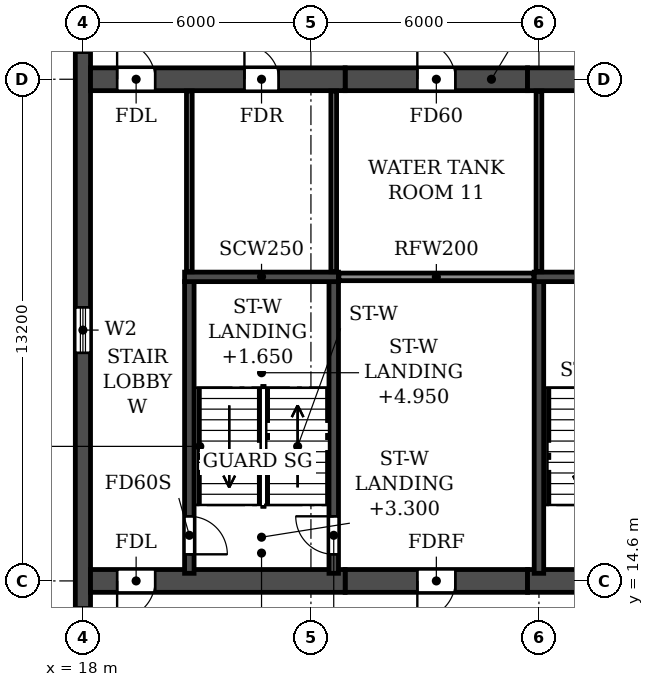
"""IFC4 building model, lengths in metres.
Left out: names, types, materials, properties, quantities, classifications, styles, units other than length and angle.
Written with IfcOpenShell. Run it as: python <this file> out.ifc"""

import sys

from ifc_helpers import new_model, si_unit, direction, frame, frame_2d, origin, place, context, subcontext, project, spatial, rectangle, extrude, element, fill, save


model = new_model("IFC4")
c1 = context("Model", 3, precision=1e-05, world=origin(), true_north=direction((0.0, 1.0)))
c2 = subcontext(c1, "Body", "Model", "MODEL_VIEW")
j1 = project(units=[si_unit("LENGTHUNIT", "METRE"), si_unit("PLANEANGLEUNIT", "RADIAN")], contexts=[c1])
p1 = place(None, origin())
s1 = spatial("IfcSite", under=j1, at=p1, CompositionType="ELEMENT")
p2 = place(p1, origin())
s2 = spatial("IfcBuilding", under=s1, at=p2, CompositionType="ELEMENT")
p3 = place(p2, frame((0.0, 0.0, 214.8)))
s3 = spatial("IfcBuildingStorey", under=s2, at=p3, CompositionType="ELEMENT", Elevation=214.8)
p4 = place(p3, frame((18.0, 4.683, 0.0), z_axis=(0.0, 0.0, 1.0), x_axis=(0.0, 1.0, 0.0)))
e1 = element("IfcWall", 1, at=p4, inside=s3, PredefinedType="SHEAR", context=c2, shape_type="SweptSolid", body=[
    extrude(rectangle(XDim=31.834, YDim=0.4, at=frame_2d((15.917, 0.0))), origin(), (0.0, 0.0, 1.0), 6.38),
])
p5 = place(p4, frame((23.817, 0.0, 0.9)))
e2 = element("IfcOpeningElement", 2, at=p5, cuts=e1, PredefinedType="OPENING", context=c2, shape_type="SweptSolid", body=[
    extrude(rectangle(XDim=1.2, YDim=1.5, at=frame_2d((0.6, 0.75))), frame((0.0, 0.21, 0.0), z_axis=(0.0, -1.0, 0.0), x_axis=(1.0, 0.0, 0.0)), (0.0, 0.0, 1.0), 0.42),
])
p6 = place(p4, frame((8.017, 0.0, 0.9)))
e3 = element("IfcOpeningElement", 3, at=p6, cuts=e1, PredefinedType="OPENING", context=c2, shape_type="SweptSolid", body=[
    extrude(rectangle(XDim=1.2, YDim=1.5, at=frame_2d((0.6, 0.75))), frame((0.0, 0.21, 0.0), z_axis=(0.0, -1.0, 0.0), x_axis=(1.0, 0.0, 0.0)), (0.0, 0.0, 1.0), 0.42),
])
p7 = place(p4, frame((15.917, 0.0, 0.9)))
e4 = element("IfcOpeningElement", 4, at=p7, cuts=e1, PredefinedType="OPENING", context=c2, shape_type="SweptSolid", body=[
    extrude(rectangle(XDim=1.2, YDim=1.5, at=frame_2d((0.6, 0.75))), frame((0.0, 0.21, 0.0), z_axis=(0.0, -1.0, 0.0), x_axis=(1.0, 0.0, 0.0)), (0.0, 0.0, 1.0), 0.42),
])
p8 = place(p3, frame((24.9, 14.6, 0.0), z_axis=(0.0, 0.0, 1.0), x_axis=(1.0, 0.0, 0.0)))
e5 = element("IfcWall", 5, at=p8, inside=s3, PredefinedType="SHEAR", context=c2, shape_type="SweptSolid", body=[
    extrude(rectangle(XDim=4.8, YDim=0.6, at=frame_2d((2.4, 0.0))), origin(), (0.0, 0.0, 1.0), 6.38),
])
p9 = place(p8, frame((1.9, 0.0, 0.0)))
e6 = element("IfcOpeningElement", 6, at=p9, cuts=e5, PredefinedType="OPENING", context=c2, shape_type="SweptSolid", body=[
    extrude(rectangle(XDim=1.0, YDim=2.1, at=frame_2d((0.5, 1.05))), frame((0.0, 0.31, 0.0), z_axis=(0.0, -1.0, 0.0), x_axis=(1.0, 0.0, 0.0)), (0.0, 0.0, 1.0), 0.62),
])
p10 = place(p3, frame((24.9, 27.8, 0.0), z_axis=(0.0, 0.0, 1.0), x_axis=(1.0, 0.0, 0.0)))
e7 = element("IfcWall", 7, at=p10, inside=s3, PredefinedType="SHEAR", context=c2, shape_type="SweptSolid", body=[
    extrude(rectangle(XDim=4.8, YDim=0.6, at=frame_2d((2.4, 0.0))), origin(), (0.0, 0.0, 1.0), 6.38),
])
p11 = place(p10, frame((1.9, 0.0, 0.0)))
e8 = element("IfcOpeningElement", 8, at=p11, cuts=e7, PredefinedType="OPENING", context=c2, shape_type="SweptSolid", body=[
    extrude(rectangle(XDim=1.0, YDim=2.1, at=frame_2d((0.5, 1.05))), frame((0.0, 0.31, 0.0), z_axis=(0.0, -1.0, 0.0), x_axis=(1.0, 0.0, 0.0)), (0.0, 0.0, 1.0), 0.62),
])
p12 = place(p3, frame((18.2, 14.6, 0.0), z_axis=(0.0, 0.0, 1.0), x_axis=(1.0, 0.0, 0.0)))
e9 = element("IfcWall", 9, at=p12, inside=s3, PredefinedType="SOLIDWALL", context=c2, shape_type="SweptSolid", body=[
    extrude(rectangle(XDim=6.7, YDim=0.6, at=frame_2d((3.35, 0.0))), origin(), (0.0, 0.0, 1.0), 6.38),
])
p13 = place(p12, frame((0.7, 0.0, 0.0)))
e10 = element("IfcOpeningElement", 10, at=p13, cuts=e9, PredefinedType="OPENING", context=c2, shape_type="SweptSolid", body=[
    extrude(rectangle(XDim=1.0, YDim=2.1, at=frame_2d((0.5, 1.05))), frame((0.0, 0.31, 0.0), z_axis=(0.0, -1.0, 0.0), x_axis=(1.0, 0.0, 0.0)), (0.0, 0.0, 1.0), 0.62),
])
p14 = place(p3, frame((29.7, 14.6, 0.0), z_axis=(0.0, 0.0, 1.0), x_axis=(1.0, 0.0, 0.0)))
e11 = element("IfcWall", 11, at=p14, inside=s3, PredefinedType="SOLIDWALL", context=c2, shape_type="SweptSolid", body=[
    extrude(rectangle(XDim=42.6, YDim=0.6, at=frame_2d((21.3, 0.0))), origin(), (0.0, 0.0, 1.0), 6.38),
])
p15 = place(p14, frame((1.7, 0.0, 0.0)))
e12 = element("IfcOpeningElement", 12, at=p15, cuts=e11, PredefinedType="OPENING", context=c2, shape_type="SweptSolid", body=[
    extrude(rectangle(XDim=1.0, YDim=2.1, at=frame_2d((0.5, 1.05))), frame((0.0, 0.31, 0.0), z_axis=(0.0, -1.0, 0.0), x_axis=(1.0, 0.0, 0.0)), (0.0, 0.0, 1.0), 0.62),
])
p16 = place(p14, frame((15.6, 0.0, 0.0)))
e13 = element("IfcOpeningElement", 13, at=p16, cuts=e11, PredefinedType="OPENING", context=c2, shape_type="SweptSolid", body=[
    extrude(rectangle(XDim=1.0, YDim=2.1, at=frame_2d((0.5, 1.05))), frame((0.0, 0.31, 0.0), z_axis=(0.0, -1.0, 0.0), x_axis=(1.0, 0.0, 0.0)), (0.0, 0.0, 1.0), 0.62),
])
p17 = place(p14, frame((20.8, 0.0, 0.0)))
e14 = element("IfcOpeningElement", 14, at=p17, cuts=e11, PredefinedType="OPENING", context=c2, shape_type="SweptSolid", body=[
    extrude(rectangle(XDim=1.0, YDim=2.1, at=frame_2d((0.5, 1.05))), frame((0.0, 0.31, 0.0), z_axis=(0.0, -1.0, 0.0), x_axis=(1.0, 0.0, 0.0)), (0.0, 0.0, 1.0), 0.62),
])
p18 = place(p14, frame((25.75, 0.0, 0.0)))
e15 = element("IfcOpeningElement", 15, at=p18, cuts=e11, PredefinedType="OPENING", context=c2, shape_type="SweptSolid", body=[
    extrude(rectangle(XDim=1.5, YDim=2.1, at=frame_2d((0.75, 1.05))), frame((0.0, 0.31, 0.0), z_axis=(0.0, -1.0, 0.0), x_axis=(1.0, 0.0, 0.0)), (0.0, 0.0, 1.0), 0.62),
])
p19 = place(p14, frame((39.9, 0.0, 0.0)))
e16 = element("IfcOpeningElement", 16, at=p19, cuts=e11, PredefinedType="OPENING", context=c2, shape_type="SweptSolid", body=[
    extrude(rectangle(XDim=1.0, YDim=2.1, at=frame_2d((0.5, 1.05))), frame((0.0, 0.31, 0.0), z_axis=(0.0, -1.0, 0.0), x_axis=(1.0, 0.0, 0.0)), (0.0, 0.0, 1.0), 0.62),
])
p20 = place(p3, frame((18.2, 27.8, 0.0), z_axis=(0.0, 0.0, 1.0), x_axis=(1.0, 0.0, 0.0)))
e17 = element("IfcWall", 17, at=p20, inside=s3, PredefinedType="SOLIDWALL", context=c2, shape_type="SweptSolid", body=[
    extrude(rectangle(XDim=6.7, YDim=0.6, at=frame_2d((3.35, 0.0))), origin(), (0.0, 0.0, 1.0), 6.38),
])
p21 = place(p20, frame((0.7, 0.0, 0.0)))
e18 = element("IfcOpeningElement", 18, at=p21, cuts=e17, PredefinedType="OPENING", context=c2, shape_type="SweptSolid", body=[
    extrude(rectangle(XDim=1.0, YDim=2.1, at=frame_2d((0.5, 1.05))), frame((0.0, 0.31, 0.0), z_axis=(0.0, -1.0, 0.0), x_axis=(1.0, 0.0, 0.0)), (0.0, 0.0, 1.0), 0.62),
])
p22 = place(p20, frame((4.05, 0.0, 0.0)))
e19 = element("IfcOpeningElement", 19, at=p22, cuts=e17, PredefinedType="OPENING", context=c2, shape_type="SweptSolid", body=[
    extrude(rectangle(XDim=0.9, YDim=2.1, at=frame_2d((0.45, 1.05))), frame((0.0, 0.31, 0.0), z_axis=(0.0, -1.0, 0.0), x_axis=(1.0, 0.0, 0.0)), (0.0, 0.0, 1.0), 0.62),
])
p23 = place(p3, frame((29.7, 27.8, 0.0), z_axis=(0.0, 0.0, 1.0), x_axis=(1.0, 0.0, 0.0)))
e20 = element("IfcWall", 20, at=p23, inside=s3, PredefinedType="SOLIDWALL", context=c2, shape_type="SweptSolid", body=[
    extrude(rectangle(XDim=42.6, YDim=0.6, at=frame_2d((21.3, 0.0))), origin(), (0.0, 0.0, 1.0), 6.38),
])
p24 = place(p23, frame((1.75, 0.0, 0.0)))
e21 = element("IfcOpeningElement", 21, at=p24, cuts=e20, PredefinedType="OPENING", context=c2, shape_type="SweptSolid", body=[
    extrude(rectangle(XDim=0.9, YDim=2.1, at=frame_2d((0.45, 1.05))), frame((0.0, 0.31, 0.0), z_axis=(0.0, -1.0, 0.0), x_axis=(1.0, 0.0, 0.0)), (0.0, 0.0, 1.0), 0.62),
])
p25 = place(p23, frame((7.5, 0.0, 0.0)))
e22 = element("IfcOpeningElement", 22, at=p25, cuts=e20, PredefinedType="OPENING", context=c2, shape_type="SweptSolid", body=[
    extrude(rectangle(XDim=1.0, YDim=2.1, at=frame_2d((0.5, 1.05))), frame((0.0, 0.31, 0.0), z_axis=(0.0, -1.0, 0.0), x_axis=(1.0, 0.0, 0.0)), (0.0, 0.0, 1.0), 0.62),
])
p26 = place(p23, frame((12.7, 0.0, 0.0)))
e23 = element("IfcOpeningElement", 23, at=p26, cuts=e20, PredefinedType="OPENING", context=c2, shape_type="SweptSolid", body=[
    extrude(rectangle(XDim=1.0, YDim=2.1, at=frame_2d((0.5, 1.05))), frame((0.0, 0.31, 0.0), z_axis=(0.0, -1.0, 0.0), x_axis=(1.0, 0.0, 0.0)), (0.0, 0.0, 1.0), 0.62),
])
p27 = place(p23, frame((17.9, 0.0, 0.0)))
e24 = element("IfcOpeningElement", 24, at=p27, cuts=e20, PredefinedType="OPENING", context=c2, shape_type="SweptSolid", body=[
    extrude(rectangle(XDim=1.0, YDim=2.1, at=frame_2d((0.5, 1.05))), frame((0.0, 0.31, 0.0), z_axis=(0.0, -1.0, 0.0), x_axis=(1.0, 0.0, 0.0)), (0.0, 0.0, 1.0), 0.62),
])
p28 = place(p23, frame((20.8, 0.0, 0.0)))
e25 = element("IfcOpeningElement", 25, at=p28, cuts=e20, PredefinedType="OPENING", context=c2, shape_type="SweptSolid", body=[
    extrude(rectangle(XDim=1.0, YDim=2.1, at=frame_2d((0.5, 1.05))), frame((0.0, 0.31, 0.0), z_axis=(0.0, -1.0, 0.0), x_axis=(1.0, 0.0, 0.0)), (0.0, 0.0, 1.0), 0.62),
])
p29 = place(p23, frame((23.7, 0.0, 0.0)))
e26 = element("IfcOpeningElement", 26, at=p29, cuts=e20, PredefinedType="OPENING", context=c2, shape_type="SweptSolid", body=[
    extrude(rectangle(XDim=1.0, YDim=2.1, at=frame_2d((0.5, 1.05))), frame((0.0, 0.31, 0.0), z_axis=(0.0, -1.0, 0.0), x_axis=(1.0, 0.0, 0.0)), (0.0, 0.0, 1.0), 0.62),
])
p30 = place(p23, frame((26.3, 0.0, 0.0)))
e27 = element("IfcOpeningElement", 27, at=p30, cuts=e20, PredefinedType="OPENING", context=c2, shape_type="SweptSolid", body=[
    extrude(rectangle(XDim=1.0, YDim=2.1, at=frame_2d((0.5, 1.05))), frame((0.0, 0.31, 0.0), z_axis=(0.0, -1.0, 0.0), x_axis=(1.0, 0.0, 0.0)), (0.0, 0.0, 1.0), 0.62),
])
p31 = place(p23, frame((28.9, 0.0, 0.0)))
e28 = element("IfcOpeningElement", 28, at=p31, cuts=e20, PredefinedType="OPENING", context=c2, shape_type="SweptSolid", body=[
    extrude(rectangle(XDim=1.0, YDim=2.1, at=frame_2d((0.5, 1.05))), frame((0.0, 0.31, 0.0), z_axis=(0.0, -1.0, 0.0), x_axis=(1.0, 0.0, 0.0)), (0.0, 0.0, 1.0), 0.62),
])
p32 = place(p23, frame((31.5, 0.0, 0.0)))
e29 = element("IfcOpeningElement", 29, at=p32, cuts=e20, PredefinedType="OPENING", context=c2, shape_type="SweptSolid", body=[
    extrude(rectangle(XDim=1.0, YDim=2.1, at=frame_2d((0.5, 1.05))), frame((0.0, 0.31, 0.0), z_axis=(0.0, -1.0, 0.0), x_axis=(1.0, 0.0, 0.0)), (0.0, 0.0, 1.0), 0.62),
])
p33 = place(p23, frame((35.4, 0.0, 0.0)))
e30 = element("IfcOpeningElement", 30, at=p33, cuts=e20, PredefinedType="OPENING", context=c2, shape_type="SweptSolid", body=[
    extrude(rectangle(XDim=1.0, YDim=2.1, at=frame_2d((0.5, 1.05))), frame((0.0, 0.31, 0.0), z_axis=(0.0, -1.0, 0.0), x_axis=(1.0, 0.0, 0.0)), (0.0, 0.0, 1.0), 0.62),
])
p34 = place(p23, frame((39.95, 0.0, 0.0)))
e31 = element("IfcOpeningElement", 31, at=p34, cuts=e20, PredefinedType="OPENING", context=c2, shape_type="SweptSolid", body=[
    extrude(rectangle(XDim=0.9, YDim=2.1, at=frame_2d((0.45, 1.05))), frame((0.0, 0.31, 0.0), z_axis=(0.0, -1.0, 0.0), x_axis=(1.0, 0.0, 0.0)), (0.0, 0.0, 1.0), 0.62),
])
p35 = place(p3, frame((30.0, 14.8, 0.0), z_axis=(0.0, 0.0, 1.0), x_axis=(0.0, 1.0, 0.0)))
e32 = element("IfcWall", 32, at=p35, inside=s3, PredefinedType="SOLIDWALL", context=c2, shape_type="SweptSolid", body=[
    extrude(rectangle(XDim=7.675, YDim=0.25, at=frame_2d((3.837, 0.0))), origin(), (0.0, 0.0, 1.0), 6.38),
])
p36 = place(p3, frame((29.875, 22.6, 0.0), z_axis=(0.0, 0.0, 1.0), x_axis=(1.0, 0.0, 0.0)))
e33 = element("IfcWall", 33, at=p36, inside=s3, PredefinedType="SOLIDWALL", context=c2, shape_type="SweptSolid", body=[
    extrude(rectangle(XDim=4.05, YDim=0.25, at=frame_2d((2.025, 0.0))), origin(), (0.0, 0.0, 1.0), 6.38),
])
p37 = place(p3, frame((20.8, 14.8, 0.0), z_axis=(0.0, 0.0, 1.0), x_axis=(0.0, 1.0, 0.0)))
e34 = element("IfcWall", 34, at=p37, inside=s3, PredefinedType="SOLIDWALL", context=c2, shape_type="SweptSolid", body=[
    extrude(rectangle(XDim=7.675, YDim=0.25, at=frame_2d((3.837, 0.0))), origin(), (0.0, 0.0, 1.0), 6.38),
])
p38 = place(p37, frame((0.5, 0.0, 0.0)))
e35 = element("IfcOpeningElement", 35, at=p38, cuts=e34, PredefinedType="OPENING", context=c2, shape_type="SweptSolid", body=[
    extrude(rectangle(XDim=1.0, YDim=2.1, at=frame_2d((0.5, 1.05))), frame((0.0, 0.135, 0.0), z_axis=(0.0, -1.0, 0.0), x_axis=(1.0, 0.0, 0.0)), (0.0, 0.0, 1.0), 0.27),
])
p39 = place(p3, frame((24.6, 14.8, 0.0), z_axis=(0.0, 0.0, 1.0), x_axis=(0.0, 1.0, 0.0)))
e36 = element("IfcWall", 36, at=p39, inside=s3, PredefinedType="SOLIDWALL", context=c2, shape_type="SweptSolid", body=[
    extrude(rectangle(XDim=7.675, YDim=0.25, at=frame_2d((3.837, 0.0))), origin(), (0.0, 0.0, 1.0), 6.38),
])
p40 = place(p39, frame((0.5, 0.0, 0.0)))
e37 = element("IfcOpeningElement", 37, at=p40, cuts=e36, PredefinedType="OPENING", context=c2, shape_type="SweptSolid", body=[
    extrude(rectangle(XDim=1.0, YDim=2.1, at=frame_2d((0.5, 1.05))), frame((0.0, 0.135, 0.0), z_axis=(0.0, -1.0, 0.0), x_axis=(1.0, 0.0, 0.0)), (0.0, 0.0, 1.0), 0.27),
])
p41 = place(p3, frame((20.675, 22.6, 0.0), z_axis=(0.0, 0.0, 1.0), x_axis=(1.0, 0.0, 0.0)))
e38 = element("IfcWall", 38, at=p41, inside=s3, PredefinedType="SOLIDWALL", context=c2, shape_type="SweptSolid", body=[
    extrude(rectangle(XDim=4.05, YDim=0.25, at=frame_2d((2.025, 0.0))), origin(), (0.0, 0.0, 1.0), 6.38),
])
p42 = place(p3, frame((24.735, 22.6, 0.0), z_axis=(0.0, 0.0, 1.0), x_axis=(1.0, 0.0, 0.0)))
e39 = element("IfcWall", 39, at=p42, inside=s3, PredefinedType="PARTITIONING", context=c2, shape_type="SweptSolid", body=[
    extrude(rectangle(XDim=5.13, YDim=0.2, at=frame_2d((2.565, 0.0))), origin(), (0.0, 0.0, 1.0), 6.38),
])
for number, where, z_axis, x_axis in (
    (40, (20.8, 22.735, 0.0), (0.0, 0.0, 1.0), (0.0, 1.0, 0.0)),
    (41, (24.6, 22.735, 0.0), (0.0, 0.0, 1.0), (0.0, 1.0, 0.0)),
    (42, (30.0, 22.735, 0.0), (0.0, 0.0, 1.0), (0.0, 1.0, 0.0)),
):
    element("IfcWall", number, at=place(p3, frame(where, z_axis=z_axis, x_axis=x_axis)), inside=s3, PredefinedType="PARTITIONING", context=c2, shape_type="SweptSolid", body=[
        extrude(rectangle(XDim=4.755, YDim=0.15, at=frame_2d((2.377, 0.0))), origin(), (0.0, 0.0, 1.0), 6.38),
    ])
p43 = place(p6, origin())
e43 = element("IfcWindow", 43, at=p43, inside=s3, PartitioningType="SINGLE_PANEL", PredefinedType="WINDOW", context=c2, shape_type="SweptSolid", body=[
    extrude(rectangle(XDim=1.2, YDim=1.5, at=frame_2d((0.6, 0.75))), frame((0.0, 0.03, 0.0), z_axis=(0.0, -1.0, 0.0), x_axis=(1.0, 0.0, 0.0)), (0.0, 0.0, 1.0), 0.06),
])
fill(e3, e43)
p44 = place(p7, origin())
e44 = element("IfcWindow", 44, at=p44, inside=s3, PartitioningType="SINGLE_PANEL", PredefinedType="WINDOW", context=c2, shape_type="SweptSolid", body=[
    extrude(rectangle(XDim=1.2, YDim=1.5, at=frame_2d((0.6, 0.75))), frame((0.0, 0.03, 0.0), z_axis=(0.0, -1.0, 0.0), x_axis=(1.0, 0.0, 0.0)), (0.0, 0.0, 1.0), 0.06),
])
fill(e4, e44)
p45 = place(p21, origin())
e45 = element("IfcDoor", 45, at=p45, inside=s3, OperationType="SINGLE_SWING_LEFT", PredefinedType="DOOR", context=c2, shape_type="SweptSolid", body=[
    extrude(rectangle(XDim=1.0, YDim=2.1, at=frame_2d((0.5, 1.05))), frame((0.0, 0.025, 0.0), z_axis=(0.0, -1.0, 0.0), x_axis=(1.0, 0.0, 0.0)), (0.0, 0.0, 1.0), 0.05),
])
fill(e18, e45)
p46 = place(p22, origin())
e46 = element("IfcDoor", 46, at=p46, inside=s3, OperationType="SINGLE_SWING_LEFT", PredefinedType="DOOR", context=c2, shape_type="SweptSolid", body=[
    extrude(rectangle(XDim=0.9, YDim=2.1, at=frame_2d((0.45, 1.05))), frame((0.0, 0.025, 0.0), z_axis=(0.0, -1.0, 0.0), x_axis=(1.0, 0.0, 0.0)), (0.0, 0.0, 1.0), 0.05),
])
fill(e19, e46)
p47 = place(p11, origin())
e47 = element("IfcDoor", 47, at=p47, inside=s3, OperationType="SINGLE_SWING_LEFT", PredefinedType="DOOR", context=c2, shape_type="SweptSolid", body=[
    extrude(rectangle(XDim=1.0, YDim=2.1, at=frame_2d((0.5, 1.05))), frame((0.0, 0.025, 0.0), z_axis=(0.0, -1.0, 0.0), x_axis=(1.0, 0.0, 0.0)), (0.0, 0.0, 1.0), 0.05),
])
fill(e8, e47)
p48 = place(p13, frame((1.0, 0.0, 0.0), z_axis=(0.0, 0.0, 1.0), x_axis=(-1.0, 0.0, 0.0)))
e48 = element("IfcDoor", 48, at=p48, inside=s3, OperationType="SINGLE_SWING_RIGHT", PredefinedType="DOOR", context=c2, shape_type="SweptSolid", body=[
    extrude(rectangle(XDim=1.0, YDim=2.1, at=frame_2d((0.5, 1.05))), frame((0.0, 0.025, 0.0), z_axis=(0.0, -1.0, 0.0), x_axis=(1.0, 0.0, 0.0)), (0.0, 0.0, 1.0), 0.05),
])
fill(e10, e48)
p49 = place(p9, frame((1.0, 0.0, 0.0), z_axis=(0.0, 0.0, 1.0), x_axis=(-1.0, 0.0, 0.0)))
e49 = element("IfcDoor", 49, at=p49, inside=s3, OperationType="SINGLE_SWING_RIGHT", PredefinedType="DOOR", context=c2, shape_type="SweptSolid", body=[
    extrude(rectangle(XDim=1.0, YDim=2.1, at=frame_2d((0.5, 1.05))), frame((0.0, 0.025, 0.0), z_axis=(0.0, -1.0, 0.0), x_axis=(1.0, 0.0, 0.0)), (0.0, 0.0, 1.0), 0.05),
])
fill(e6, e49)
p50 = place(p40, origin())
e50 = element("IfcDoor", 50, at=p50, inside=s3, OperationType="SINGLE_SWING_RIGHT", PredefinedType="DOOR", context=c2, shape_type="SweptSolid", body=[
    extrude(rectangle(XDim=1.0, YDim=2.1, at=frame_2d((0.5, 1.05))), frame((0.0, 0.025, 0.0), z_axis=(0.0, -1.0, 0.0), x_axis=(1.0, 0.0, 0.0)), (0.0, 0.0, 1.0), 0.05),
])
fill(e37, e50)
p51 = place(p38, frame((1.0, 0.0, 0.0), z_axis=(0.0, 0.0, 1.0), x_axis=(-1.0, 0.0, 0.0)))
e51 = element("IfcDoor", 51, at=p51, inside=s3, OperationType="SINGLE_SWING_RIGHT", PredefinedType="DOOR", context=c2, shape_type="SweptSolid", body=[
    extrude(rectangle(XDim=1.0, YDim=2.1, at=frame_2d((0.5, 1.05))), frame((0.0, 0.025, 0.0), z_axis=(0.0, -1.0, 0.0), x_axis=(1.0, 0.0, 0.0)), (0.0, 0.0, 1.0), 0.05),
])
fill(e35, e51)
save(model, sys.argv[1])
